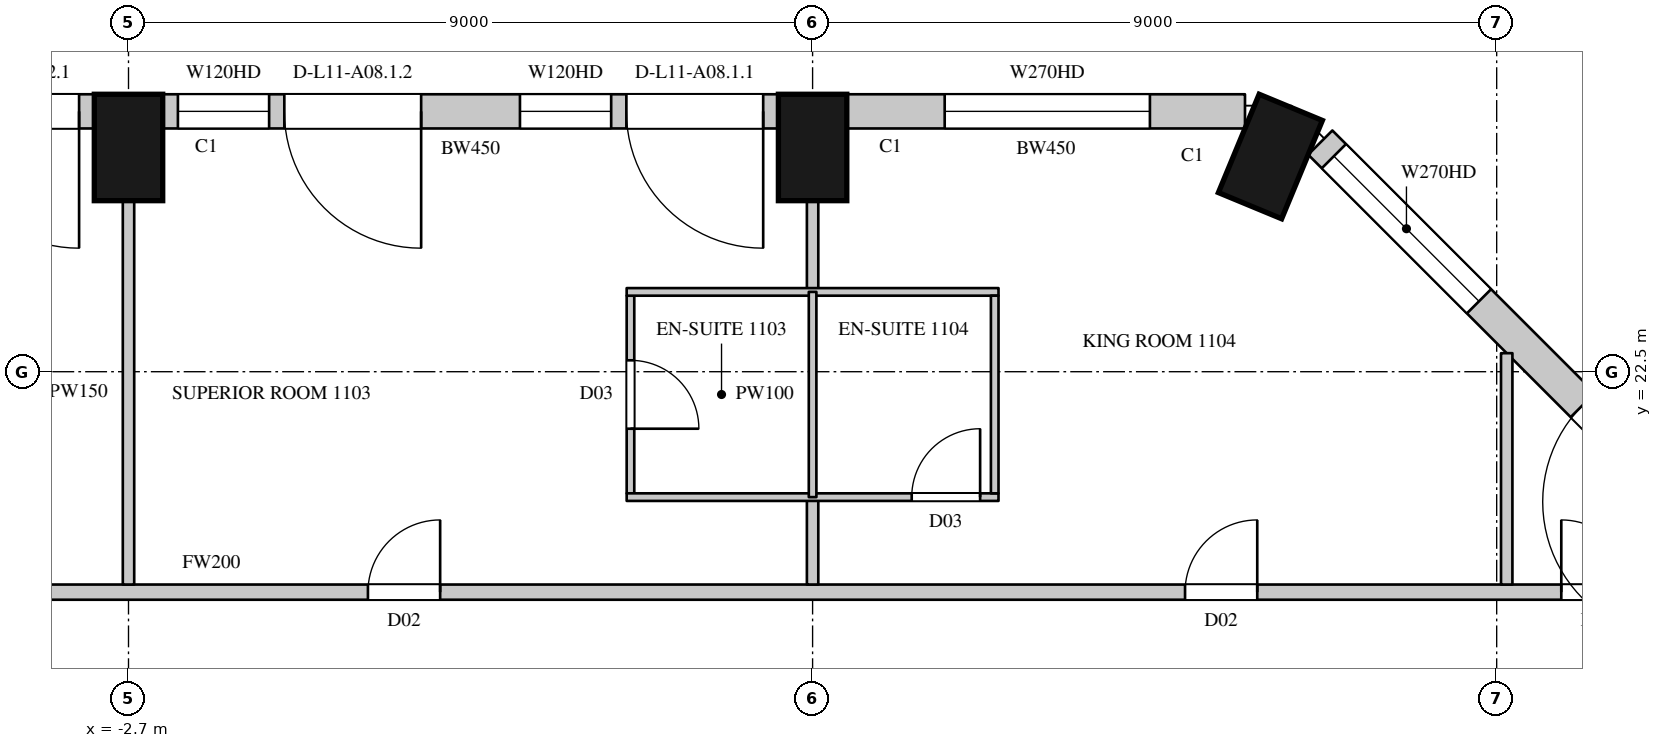
"""IFC4 building model, lengths in metres.
Left out: names, types, materials, properties, quantities, classifications, styles, units other than length and angle.
Written with IfcOpenShell. Run it as: python <this file> out.ifc"""

import sys

from ifc_helpers import new_model, si_unit, direction, frame, frame_2d, origin, origin_2d, place, context, subcontext, project, spatial, rectangle, extrude, element, fill, save


model = new_model("IFC4")
c1 = context("Model", 3, precision=1e-05, world=origin(), true_north=direction((0.0, 1.0)))
c2 = subcontext(c1, "Body", "Model", "MODEL_VIEW")
j1 = project(units=[si_unit("LENGTHUNIT", "METRE"), si_unit("PLANEANGLEUNIT", "RADIAN")], contexts=[c1])
p1 = place(None, origin())
s1 = spatial("IfcSite", under=j1, at=p1, CompositionType="ELEMENT")
p2 = place(p1, origin())
s2 = spatial("IfcBuilding", under=s1, at=p2, CompositionType="ELEMENT")
p3 = place(p2, frame((0.0, 0.0, 69.9)))
s3 = spatial("IfcBuildingStorey", under=s2, at=p3, CompositionType="ELEMENT", Elevation=69.9)
for number, where, z_axis, x_axis in (
    (1, (12.323, 25.331, 0.0), (0.0, 0.0, 1.0), (-0.924, 0.383, 0.0)),
    (2, (6.3, 25.45, 0.0), (0.0, 0.0, 1.0), (-1.0, 0.0, 0.0)),
    (3, (-2.7, 25.45, 0.0), (0.0, 0.0, 1.0), (-1.0, 0.0, 0.0)),
):
    element("IfcColumn", number, at=place(p3, frame(where, z_axis=z_axis, x_axis=x_axis)), inside=s3, PredefinedType="COLUMN", context=c2, shape_type="SweptSolid", body=[
        extrude(rectangle(XDim=0.9, YDim=1.4, at=origin_2d()), origin(), (0.0, 0.0, 1.0), 3.6),
    ])
p4 = place(p3, frame((18.229, 20.265, 0.0), z_axis=(0.0, 0.0, 1.0), x_axis=(-0.707106781187, 0.707106781187, 0.0)))
e4 = element("IfcWall", 4, at=p4, inside=s3, PredefinedType="SOLIDWALL", context=c2, shape_type="SweptSolid", body=[
    extrude(rectangle(XDim=7.424, YDim=0.45, at=frame_2d((3.712, 0.0))), origin(), (0.0, 0.0, 1.0), 3.3),
])
p5 = place(p4, frame((0.74, 0.0, 0.0)))
e5 = element("IfcOpeningElement", 5, at=p5, cuts=e4, PredefinedType="OPENING", context=c2, shape_type="SweptSolid", body=[
    extrude(rectangle(XDim=1.8, YDim=2.4, at=frame_2d((0.9, 1.2))), frame((0.0, 0.235, 0.0), z_axis=(0.0, -1.0, 0.0), x_axis=(1.0, 0.0, 0.0)), (0.0, 0.0, 1.0), 0.47),
])
p6 = place(p4, frame((4.471, 0.0, 1.05)))
e6 = element("IfcOpeningElement", 6, at=p6, cuts=e4, PredefinedType="OPENING", context=c2, shape_type="SweptSolid", body=[
    extrude(rectangle(XDim=2.7, YDim=2.0, at=frame_2d((1.35, 1.0))), frame((0.0, 0.235, 0.0), z_axis=(0.0, -1.0, 0.0), x_axis=(1.0, 0.0, 0.0)), (0.0, 0.0, 1.0), 0.47),
])
p7 = place(p3, frame((11.989, 25.925, 0.0), z_axis=(0.0, 0.0, 1.0), x_axis=(-1.0, 0.0, 0.0)))
e7 = element("IfcWall", 7, at=p7, inside=s3, PredefinedType="SOLIDWALL", context=c2, shape_type="SweptSolid", body=[
    extrude(rectangle(XDim=5.239, YDim=0.45, at=frame_2d((2.619, 0.0))), origin(), (0.0, 0.0, 1.0), 3.3),
])
p8 = place(p7, frame((1.251, 0.0, 1.05)))
e8 = element("IfcOpeningElement", 8, at=p8, cuts=e7, PredefinedType="OPENING", context=c2, shape_type="SweptSolid", body=[
    extrude(rectangle(XDim=2.7, YDim=2.0, at=frame_2d((1.35, 1.0))), frame((0.0, 0.235, 0.0), z_axis=(0.0, -1.0, 0.0), x_axis=(1.0, 0.0, 0.0)), (0.0, 0.0, 1.0), 0.47),
])
p9 = place(p3, frame((5.85, 25.925, 0.0), z_axis=(0.0, 0.0, 1.0), x_axis=(-1.0, 0.0, 0.0)))
e9 = element("IfcWall", 9, at=p9, inside=s3, PredefinedType="SOLIDWALL", context=c2, shape_type="SweptSolid", body=[
    extrude(rectangle(XDim=8.1, YDim=0.45, at=frame_2d((4.05, 0.0))), origin(), (0.0, 0.0, 1.0), 3.3),
])
p10 = place(p9, frame((0.2, 0.0, 0.0)))
e10 = element("IfcOpeningElement", 10, at=p10, cuts=e9, PredefinedType="OPENING", context=c2, shape_type="SweptSolid", body=[
    extrude(rectangle(XDim=1.8, YDim=2.4, at=frame_2d((0.9, 1.2))), frame((0.0, 0.235, 0.0), z_axis=(0.0, -1.0, 0.0), x_axis=(1.0, 0.0, 0.0)), (0.0, 0.0, 1.0), 0.47),
])
p11 = place(p9, frame((2.2, 0.0, 1.05)))
e11 = element("IfcOpeningElement", 11, at=p11, cuts=e9, PredefinedType="OPENING", context=c2, shape_type="SweptSolid", body=[
    extrude(rectangle(XDim=1.2, YDim=2.0, at=frame_2d((0.6, 1.0))), frame((0.0, 0.235, 0.0), z_axis=(0.0, -1.0, 0.0), x_axis=(1.0, 0.0, 0.0)), (0.0, 0.0, 1.0), 0.47),
])
p12 = place(p9, frame((4.7, 0.0, 0.0)))
e12 = element("IfcOpeningElement", 12, at=p12, cuts=e9, PredefinedType="OPENING", context=c2, shape_type="SweptSolid", body=[
    extrude(rectangle(XDim=1.8, YDim=2.4, at=frame_2d((0.9, 1.2))), frame((0.0, 0.235, 0.0), z_axis=(0.0, -1.0, 0.0), x_axis=(1.0, 0.0, 0.0)), (0.0, 0.0, 1.0), 0.47),
])
p13 = place(p9, frame((6.7, 0.0, 1.05)))
e13 = element("IfcOpeningElement", 13, at=p13, cuts=e9, PredefinedType="OPENING", context=c2, shape_type="SweptSolid", body=[
    extrude(rectangle(XDim=1.2, YDim=2.0, at=frame_2d((0.6, 1.0))), frame((0.0, 0.235, 0.0), z_axis=(0.0, -1.0, 0.0), x_axis=(1.0, 0.0, 0.0)), (0.0, 0.0, 1.0), 0.47),
])
p14 = place(p3, frame((-3.15, 25.925, 0.0), z_axis=(0.0, 0.0, 1.0), x_axis=(-1.0, 0.0, 0.0)))
e14 = element("IfcWall", 14, at=p14, inside=s3, PredefinedType="SOLIDWALL", context=c2, shape_type="SweptSolid", body=[
    extrude(rectangle(XDim=8.1, YDim=0.45, at=frame_2d((4.05, 0.0))), origin(), (0.0, 0.0, 1.0), 3.3),
])
p15 = place(p14, frame((0.2, 0.0, 0.0)))
e15 = element("IfcOpeningElement", 15, at=p15, cuts=e14, PredefinedType="OPENING", context=c2, shape_type="SweptSolid", body=[
    extrude(rectangle(XDim=1.8, YDim=2.4, at=frame_2d((0.9, 1.2))), frame((0.0, 0.235, 0.0), z_axis=(0.0, -1.0, 0.0), x_axis=(1.0, 0.0, 0.0)), (0.0, 0.0, 1.0), 0.47),
])
p16 = place(p14, frame((2.2, 0.0, 1.05)))
e16 = element("IfcOpeningElement", 16, at=p16, cuts=e14, PredefinedType="OPENING", context=c2, shape_type="SweptSolid", body=[
    extrude(rectangle(XDim=1.2, YDim=2.0, at=frame_2d((0.6, 1.0))), frame((0.0, 0.235, 0.0), z_axis=(0.0, -1.0, 0.0), x_axis=(1.0, 0.0, 0.0)), (0.0, 0.0, 1.0), 0.47),
])
p17 = place(p14, frame((4.7, 0.0, 0.0)))
e17 = element("IfcOpeningElement", 17, at=p17, cuts=e14, PredefinedType="OPENING", context=c2, shape_type="SweptSolid", body=[
    extrude(rectangle(XDim=1.8, YDim=2.4, at=frame_2d((0.9, 1.2))), frame((0.0, 0.235, 0.0), z_axis=(0.0, -1.0, 0.0), x_axis=(1.0, 0.0, 0.0)), (0.0, 0.0, 1.0), 0.47),
])
p18 = place(p14, frame((6.7, 0.0, 1.05)))
e18 = element("IfcOpeningElement", 18, at=p18, cuts=e14, PredefinedType="OPENING", context=c2, shape_type="SweptSolid", body=[
    extrude(rectangle(XDim=1.2, YDim=2.0, at=frame_2d((0.6, 1.0))), frame((0.0, 0.235, 0.0), z_axis=(0.0, -1.0, 0.0), x_axis=(1.0, 0.0, 0.0)), (0.0, 0.0, 1.0), 0.47),
])
p19 = place(p3, frame((16.486, 23.529, 0.0), z_axis=(0.0, 0.0, 1.0), x_axis=(-0.707022305137, 0.707191247145, 0.0)))
e19 = element("IfcWall", 19, at=p19, inside=s3, PredefinedType="SOLIDWALL", context=c2, shape_type="SweptSolid", body=[
    extrude(rectangle(XDim=1.445, YDim=0.45, at=frame_2d((0.723, 0.0))), origin(), (0.0, 0.0, 1.0), 0.6),
])
p20 = place(p3, frame((-20.7, 19.6, 0.0), z_axis=(0.0, 0.0, 1.0), x_axis=(1.0, 0.0, 0.0)))
e20 = element("IfcWall", 20, at=p20, inside=s3, PredefinedType="PARTITIONING", context=c2, shape_type="SweptSolid", body=[
    extrude(rectangle(XDim=38.184, YDim=0.2, at=frame_2d((19.092, 0.0))), origin(), (0.0, 0.0, 1.0), 3.3),
])
p21 = place(p20, frame((3.15, 0.0, 0.0)))
e21 = element("IfcOpeningElement", 21, at=p21, cuts=e20, PredefinedType="OPENING", context=c2, shape_type="SweptSolid", body=[
    extrude(rectangle(XDim=0.95, YDim=2.2, at=frame_2d((0.475, 1.1))), frame((0.0, 0.11, 0.0), z_axis=(0.0, -1.0, 0.0), x_axis=(1.0, 0.0, 0.0)), (0.0, 0.0, 1.0), 0.22),
])
p22 = place(p20, frame((13.9, 0.0, 0.0)))
e22 = element("IfcOpeningElement", 22, at=p22, cuts=e20, PredefinedType="OPENING", context=c2, shape_type="SweptSolid", body=[
    extrude(rectangle(XDim=0.95, YDim=2.2, at=frame_2d((0.475, 1.1))), frame((0.0, 0.11, 0.0), z_axis=(0.0, -1.0, 0.0), x_axis=(1.0, 0.0, 0.0)), (0.0, 0.0, 1.0), 0.22),
])
p23 = place(p20, frame((21.15, 0.0, 0.0)))
e23 = element("IfcOpeningElement", 23, at=p23, cuts=e20, PredefinedType="OPENING", context=c2, shape_type="SweptSolid", body=[
    extrude(rectangle(XDim=0.95, YDim=2.2, at=frame_2d((0.475, 1.1))), frame((0.0, 0.11, 0.0), z_axis=(0.0, -1.0, 0.0), x_axis=(1.0, 0.0, 0.0)), (0.0, 0.0, 1.0), 0.22),
])
p24 = place(p20, frame((31.9, 0.0, 0.0)))
e24 = element("IfcOpeningElement", 24, at=p24, cuts=e20, PredefinedType="OPENING", context=c2, shape_type="SweptSolid", body=[
    extrude(rectangle(XDim=0.95, YDim=2.2, at=frame_2d((0.475, 1.1))), frame((0.0, 0.11, 0.0), z_axis=(0.0, -1.0, 0.0), x_axis=(1.0, 0.0, 0.0)), (0.0, 0.0, 1.0), 0.22),
])
p25 = place(p20, frame((36.85, 0.0, 0.0)))
e25 = element("IfcOpeningElement", 25, at=p25, cuts=e20, PredefinedType="OPENING", context=c2, shape_type="SweptSolid", body=[
    extrude(rectangle(XDim=0.95, YDim=2.2, at=frame_2d((0.475, 1.1))), frame((0.0, 0.11, 0.0), z_axis=(0.0, -1.0, 0.0), x_axis=(1.0, 0.0, 0.0)), (0.0, 0.0, 1.0), 0.22),
])
p26 = place(p3, frame((-2.7, 19.7, 0.0), z_axis=(0.0, 0.0, 1.0), x_axis=(0.0, 1.0, 0.0)))
e26 = element("IfcWall", 26, at=p26, inside=s3, PredefinedType="PARTITIONING", context=c2, shape_type="SweptSolid", body=[
    extrude(rectangle(XDim=5.05, YDim=0.15, at=frame_2d((2.525, 0.0))), origin(), (0.0, 0.0, 1.0), 2.75),
])
p27 = place(p3, frame((6.3, 19.7, 0.0), z_axis=(0.0, 0.0, 1.0), x_axis=(0.0, 1.0, 0.0)))
e27 = element("IfcWall", 27, at=p27, inside=s3, PredefinedType="PARTITIONING", context=c2, shape_type="SweptSolid", body=[
    extrude(rectangle(XDim=1.15, YDim=0.15, at=frame_2d((0.575, 0.0))), origin(), (0.0, 0.0, 1.0), 2.75),
])
p28 = place(p3, frame((6.3, 23.55, 0.0), z_axis=(0.0, 0.0, 1.0), x_axis=(0.0, 1.0, 0.0)))
e28 = element("IfcWall", 28, at=p28, inside=s3, PredefinedType="PARTITIONING", context=c2, shape_type="SweptSolid", body=[
    extrude(rectangle(XDim=1.2, YDim=0.15, at=frame_2d((0.6, 0.0))), origin(), (0.0, 0.0, 1.0), 2.75),
])
p29 = place(p3, frame((15.432, 19.7, 0.0), z_axis=(0.0, 0.0, 1.0), x_axis=(0.0, 1.0, 0.0)))
e29 = element("IfcWall", 29, at=p29, inside=s3, PredefinedType="PARTITIONING", context=c2, shape_type="SweptSolid", body=[
    extrude(rectangle(XDim=3.044, YDim=0.15, at=frame_2d((1.522, 0.0))), origin(), (0.0, 0.0, 1.0), 3.3),
])
p30 = place(p3, frame((3.904, 20.9, 0.0), z_axis=(0.0, 0.0, 1.0), x_axis=(0.0, 1.0, 0.0)))
e30 = element("IfcWall", 30, at=p30, inside=s3, PredefinedType="PARTITIONING", context=c2, shape_type="SweptSolid", body=[
    extrude(rectangle(XDim=2.6, YDim=0.1, at=frame_2d((1.3, 0.0))), origin(), (0.0, 0.0, 1.0), 3.3),
])
p31 = place(p30, frame((0.85, 0.0, 0.0)))
e31 = element("IfcOpeningElement", 31, at=p31, cuts=e30, PredefinedType="OPENING", context=c2, shape_type="SweptSolid", body=[
    extrude(rectangle(XDim=0.9, YDim=2.2, at=frame_2d((0.45, 1.1))), frame((0.0, 0.06, 0.0), z_axis=(0.0, -1.0, 0.0), x_axis=(1.0, 0.0, 0.0)), (0.0, 0.0, 1.0), 0.12),
])
p32 = place(p3, frame((3.854, 20.85, 0.0), z_axis=(0.0, 0.0, 1.0), x_axis=(1.0, 0.0, 0.0)))
e32 = element("IfcWall", 32, at=p32, inside=s3, PredefinedType="PARTITIONING", context=c2, shape_type="SweptSolid", body=[
    extrude(rectangle(XDim=4.892, YDim=0.1, at=frame_2d((2.446, 0.0))), origin(), (0.0, 0.0, 1.0), 3.3),
])
p33 = place(p32, frame((3.75, 0.0, 0.0)))
e33 = element("IfcOpeningElement", 33, at=p33, cuts=e32, PredefinedType="OPENING", context=c2, shape_type="SweptSolid", body=[
    extrude(rectangle(XDim=0.9, YDim=2.2, at=frame_2d((0.45, 1.1))), frame((0.0, 0.06, 0.0), z_axis=(0.0, -1.0, 0.0), x_axis=(1.0, 0.0, 0.0)), (0.0, 0.0, 1.0), 0.12),
])
p34 = place(p3, frame((3.854, 23.55, 0.0), z_axis=(0.0, 0.0, 1.0), x_axis=(1.0, 0.0, 0.0)))
e34 = element("IfcWall", 34, at=p34, inside=s3, PredefinedType="PARTITIONING", context=c2, shape_type="SweptSolid", body=[
    extrude(rectangle(XDim=4.892, YDim=0.1, at=frame_2d((2.446, 0.0))), origin(), (0.0, 0.0, 1.0), 3.3),
])
p35 = place(p3, frame((6.3, 20.85, 0.0), z_axis=(0.0, 0.0, 1.0), x_axis=(0.0, 1.0, 0.0)))
e35 = element("IfcWall", 35, at=p35, inside=s3, PredefinedType="PARTITIONING", context=c2, shape_type="SweptSolid", body=[
    extrude(rectangle(XDim=2.7, YDim=0.1, at=frame_2d((1.35, 0.0))), origin(), (0.0, 0.0, 1.0), 2.75),
])
p36 = place(p3, frame((8.696, 20.9, 0.0), z_axis=(0.0, 0.0, 1.0), x_axis=(0.0, 1.0, 0.0)))
e36 = element("IfcWall", 36, at=p36, inside=s3, PredefinedType="PARTITIONING", context=c2, shape_type="SweptSolid", body=[
    extrude(rectangle(XDim=2.6, YDim=0.1, at=frame_2d((1.3, 0.0))), origin(), (0.0, 0.0, 1.0), 3.3),
])
p37 = place(p5, origin())
e37 = element("IfcDoor", 37, at=p37, inside=s3, OperationType="SLIDING_TO_LEFT", PredefinedType="DOOR", context=c2, shape_type="SweptSolid", body=[
    extrude(rectangle(XDim=1.8, YDim=2.4, at=frame_2d((0.9, 1.2))), frame((0.0, 0.13, 0.0), z_axis=(0.0, -1.0, 0.0), x_axis=(1.0, 0.0, 0.0)), (0.0, 0.0, 1.0), 0.05),
])
fill(e5, e37)
p38 = place(p6, origin())
e38 = element("IfcWindow", 38, at=p38, inside=s3, PartitioningType="SINGLE_PANEL", PredefinedType="WINDOW", context=c2, shape_type="SweptSolid", body=[
    extrude(rectangle(XDim=2.7, YDim=2.0, at=frame_2d((1.35, 1.0))), frame((0.0, 0.135, 0.0), z_axis=(0.0, -1.0, 0.0), x_axis=(1.0, 0.0, 0.0)), (0.0, 0.0, 1.0), 0.06),
])
fill(e6, e38)
p39 = place(p8, origin())
e39 = element("IfcWindow", 39, at=p39, inside=s3, PartitioningType="SINGLE_PANEL", PredefinedType="WINDOW", context=c2, shape_type="SweptSolid", body=[
    extrude(rectangle(XDim=2.7, YDim=2.0, at=frame_2d((1.35, 1.0))), frame((0.0, 0.135, 0.0), z_axis=(0.0, -1.0, 0.0), x_axis=(1.0, 0.0, 0.0)), (0.0, 0.0, 1.0), 0.06),
])
fill(e8, e39)
p40 = place(p10, origin())
e40 = element("IfcDoor", 40, at=p40, inside=s3, OperationType="SLIDING_TO_LEFT", PredefinedType="DOOR", context=c2, shape_type="SweptSolid", body=[
    extrude(rectangle(XDim=1.8, YDim=2.4, at=frame_2d((0.9, 1.2))), frame((0.0, 0.13, 0.0), z_axis=(0.0, -1.0, 0.0), x_axis=(1.0, 0.0, 0.0)), (0.0, 0.0, 1.0), 0.05),
])
fill(e10, e40)
p41 = place(p11, origin())
e41 = element("IfcWindow", 41, at=p41, inside=s3, PartitioningType="SINGLE_PANEL", PredefinedType="WINDOW", context=c2, shape_type="SweptSolid", body=[
    extrude(rectangle(XDim=1.2, YDim=2.0, at=frame_2d((0.6, 1.0))), frame((0.0, 0.135, 0.0), z_axis=(0.0, -1.0, 0.0), x_axis=(1.0, 0.0, 0.0)), (0.0, 0.0, 1.0), 0.06),
])
fill(e11, e41)
p42 = place(p12, origin())
e42 = element("IfcDoor", 42, at=p42, inside=s3, OperationType="SLIDING_TO_LEFT", PredefinedType="DOOR", context=c2, shape_type="SweptSolid", body=[
    extrude(rectangle(XDim=1.8, YDim=2.4, at=frame_2d((0.9, 1.2))), frame((0.0, 0.13, 0.0), z_axis=(0.0, -1.0, 0.0), x_axis=(1.0, 0.0, 0.0)), (0.0, 0.0, 1.0), 0.05),
])
fill(e12, e42)
p43 = place(p13, origin())
e43 = element("IfcWindow", 43, at=p43, inside=s3, PartitioningType="SINGLE_PANEL", PredefinedType="WINDOW", context=c2, shape_type="SweptSolid", body=[
    extrude(rectangle(XDim=1.2, YDim=2.0, at=frame_2d((0.6, 1.0))), frame((0.0, 0.135, 0.0), z_axis=(0.0, -1.0, 0.0), x_axis=(1.0, 0.0, 0.0)), (0.0, 0.0, 1.0), 0.06),
])
fill(e13, e43)
p44 = place(p15, origin())
e44 = element("IfcDoor", 44, at=p44, inside=s3, OperationType="SLIDING_TO_LEFT", PredefinedType="DOOR", context=c2, shape_type="SweptSolid", body=[
    extrude(rectangle(XDim=1.8, YDim=2.4, at=frame_2d((0.9, 1.2))), frame((0.0, 0.13, 0.0), z_axis=(0.0, -1.0, 0.0), x_axis=(1.0, 0.0, 0.0)), (0.0, 0.0, 1.0), 0.05),
])
fill(e15, e44)
p45 = place(p23, origin())
e45 = element("IfcDoor", 45, at=p45, inside=s3, OperationType="SINGLE_SWING_RIGHT", PredefinedType="DOOR", context=c2, shape_type="SweptSolid", body=[
    extrude(rectangle(XDim=0.95, YDim=2.2, at=frame_2d((0.475, 1.1))), frame((0.0, 0.025, 0.0), z_axis=(0.0, -1.0, 0.0), x_axis=(1.0, 0.0, 0.0)), (0.0, 0.0, 1.0), 0.05),
])
fill(e23, e45)
p46 = place(p31, origin())
e46 = element("IfcDoor", 46, at=p46, inside=s3, OperationType="SINGLE_SWING_RIGHT", PredefinedType="DOOR", context=c2, shape_type="SweptSolid", body=[
    extrude(rectangle(XDim=0.9, YDim=2.2, at=frame_2d((0.45, 1.1))), frame((0.0, 0.025, 0.0), z_axis=(0.0, -1.0, 0.0), x_axis=(1.0, 0.0, 0.0)), (0.0, 0.0, 1.0), 0.05),
])
fill(e31, e46)
p47 = place(p24, origin())
e47 = element("IfcDoor", 47, at=p47, inside=s3, OperationType="SINGLE_SWING_RIGHT", PredefinedType="DOOR", context=c2, shape_type="SweptSolid", body=[
    extrude(rectangle(XDim=0.95, YDim=2.2, at=frame_2d((0.475, 1.1))), frame((0.0, 0.025, 0.0), z_axis=(0.0, -1.0, 0.0), x_axis=(1.0, 0.0, 0.0)), (0.0, 0.0, 1.0), 0.05),
])
fill(e24, e47)
p48 = place(p33, origin())
e48 = element("IfcDoor", 48, at=p48, inside=s3, OperationType="SINGLE_SWING_RIGHT", PredefinedType="DOOR", context=c2, shape_type="SweptSolid", body=[
    extrude(rectangle(XDim=0.9, YDim=2.2, at=frame_2d((0.45, 1.1))), frame((0.0, 0.025, 0.0), z_axis=(0.0, -1.0, 0.0), x_axis=(1.0, 0.0, 0.0)), (0.0, 0.0, 1.0), 0.05),
])
fill(e33, e48)
p49 = place(p25, origin())
e49 = element("IfcDoor", 49, at=p49, inside=s3, OperationType="SINGLE_SWING_LEFT", PredefinedType="DOOR", context=c2, shape_type="SweptSolid", body=[
    extrude(rectangle(XDim=0.95, YDim=2.2, at=frame_2d((0.475, 1.1))), frame((0.0, 0.025, 0.0), z_axis=(0.0, -1.0, 0.0), x_axis=(1.0, 0.0, 0.0)), (0.0, 0.0, 1.0), 0.05),
])
fill(e25, e49)
save(model, sys.argv[1])
